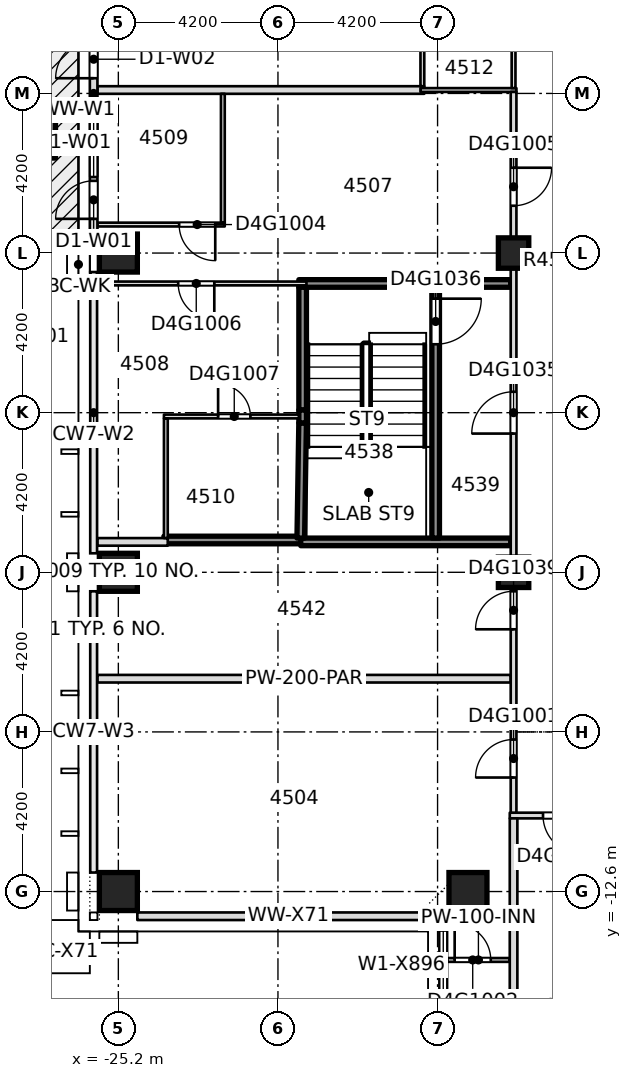
"""IFC4 building model, lengths in metres.
Left out: names, types, materials, properties, quantities, classifications, styles, units other than length and angle.
Written with IfcOpenShell. Run it as: python <this file> out.ifc"""

import sys

from ifc_helpers import new_model, si_unit, direction, frame, frame_2d, origin, origin_2d, place, context, subcontext, project, spatial, rectangle, extrude, element, fill, save


model = new_model("IFC4")
c1 = context("Model", 3, precision=1e-05, world=origin(), true_north=direction((0.0, 1.0)))
c2 = subcontext(c1, "Body", "Model", "MODEL_VIEW")
j1 = project(units=[si_unit("LENGTHUNIT", "METRE"), si_unit("PLANEANGLEUNIT", "RADIAN")], contexts=[c1])
p1 = place(None, origin())
s1 = spatial("IfcSite", under=j1, at=p1, CompositionType="ELEMENT")
p2 = place(p1, origin())
s2 = spatial("IfcBuilding", under=s1, at=p2, CompositionType="ELEMENT")
p3 = place(p2, frame((0.0, 0.0, 175.55)))
s3 = spatial("IfcBuildingStorey", under=s2, at=p3, CompositionType="ELEMENT", Elevation=175.55)
for number, where, z_axis, x_axis in (
    (1, (-25.2, -12.6, -0.4), (0.0, 0.0, 1.0), (1.0, 0.0, 0.0)),
    (2, (-16.0, -12.6, -0.4), (0.0, 0.0, 1.0), (1.0, 0.0, 0.0)),
    (3, (-25.2, -4.2, -0.4), (0.0, 0.0, 1.0), (1.0, 0.0, 0.0)),
    (4, (-25.2, 4.2, -0.4), (0.0, 0.0, 1.0), (1.0, 0.0, 0.0)),
):
    element("IfcColumn", number, at=place(p3, frame(where, z_axis=z_axis, x_axis=x_axis)), inside=s3, PredefinedType="COLUMN", context=c2, shape_type="SweptSolid", body=[
        extrude(rectangle(XDim=1.0, YDim=1.0, at=origin_2d()), origin(), (0.0, 0.0, 1.0), 3.45),
    ])
for number, where, z_axis, x_axis in (
    (5, (-14.8, -4.2, -0.4), (0.0, 0.0, 1.0), (1.0, 0.0, 0.0)),
    (6, (-14.8, 4.2, -0.4), (0.0, 0.0, 1.0), (1.0, 0.0, 0.0)),
):
    element("IfcColumn", number, at=place(p3, frame(where, z_axis=z_axis, x_axis=x_axis)), inside=s3, PredefinedType="COLUMN", context=c2, shape_type="SweptSolid", body=[
        extrude(rectangle(XDim=0.8, YDim=0.8, at=origin_2d()), origin(), (0.0, 0.0, 1.0), 3.45),
    ])
p4 = place(p3, frame((-16.55, -14.4, 0.0), z_axis=(0.0, 0.0, 1.0), x_axis=(1.0, 0.0, 0.0)))
e7 = element("IfcWall", 7, at=p4, inside=s3, PredefinedType="PARTITIONING", context=c2, shape_type="SweptSolid", body=[
    extrude(rectangle(XDim=1.65, YDim=0.1, at=frame_2d((0.825, 0.0))), origin(), (0.0, 0.0, 1.0), 3.05),
])
p5 = place(p4, frame((0.2, 0.0, 0.0)))
e8 = element("IfcOpeningElement", 8, at=p5, cuts=e7, PredefinedType="OPENING", context=c2, shape_type="SweptSolid", body=[
    extrude(rectangle(XDim=0.95, YDim=2.1, at=frame_2d((0.475, 1.05))), frame((0.0, 0.06, 0.0), z_axis=(0.0, -1.0, 0.0), x_axis=(1.0, 0.0, 0.0)), (0.0, 0.0, 1.0), 0.12),
])
p6 = place(p3, frame((-14.9, -10.6, 0.0), z_axis=(0.0, 0.0, 1.0), x_axis=(1.0, 0.0, 0.0)))
e9 = element("IfcWall", 9, at=p6, inside=s3, PredefinedType="PARTITIONING", context=c2, shape_type="SweptSolid", body=[
    extrude(rectangle(XDim=6.4, YDim=0.15, at=frame_2d((3.2, 0.0))), origin(), (0.0, 0.0, 1.0), 3.05),
])
p7 = place(p6, frame((3.95, 0.0, 0.0)))
e10 = element("IfcOpeningElement", 10, at=p7, cuts=e9, PredefinedType="OPENING", context=c2, shape_type="SweptSolid", body=[
    extrude(rectangle(XDim=1.1, YDim=2.1, at=frame_2d((0.55, 1.05))), frame((0.0, 0.085, 0.0), z_axis=(0.0, -1.0, 0.0), x_axis=(1.0, 0.0, 0.0)), (0.0, 0.0, 1.0), 0.17),
])
p8 = place(p6, frame((0.875, 0.0, 0.0)))
e11 = element("IfcOpeningElement", 11, at=p8, cuts=e9, PredefinedType="OPENING", context=c2, shape_type="SweptSolid", body=[
    extrude(rectangle(XDim=1.0, YDim=2.1, at=frame_2d((0.5, 1.05))), frame((0.0, 0.085, 0.0), z_axis=(0.0, -1.0, 0.0), x_axis=(1.0, 0.0, 0.0)), (0.0, 0.0, 1.0), 0.17),
])
p9 = place(p3, frame((-25.75, -7.0, 0.0), z_axis=(0.0, 0.0, 1.0), x_axis=(1.0, 0.0, 0.0)))
e12 = element("IfcWall", 12, at=p9, inside=s3, PredefinedType="PARTITIONING", context=c2, shape_type="SweptSolid", body=[
    extrude(rectangle(XDim=10.875, YDim=0.2, at=frame_2d((5.438, 0.0))), origin(), (0.0, 0.0, 1.0), 3.05),
])
p10 = place(p3, frame((-25.75, -3.4, 0.0), z_axis=(0.0, 0.0, 1.0), x_axis=(1.0, 0.0, 0.0)))
e13 = element("IfcWall", 13, at=p10, inside=s3, PredefinedType="PARTITIONING", context=c2, shape_type="SweptSolid", body=[
    extrude(rectangle(XDim=1.85, YDim=0.2, at=frame_2d((0.925, 0.0))), origin(), (0.0, 0.0, 1.0), 3.05),
])
p11 = place(p3, frame((-24.0, -3.35, 0.0), z_axis=(0.0, 0.0, 1.0), x_axis=(1.0, 0.0, 0.0)))
e14 = element("IfcWall", 14, at=p11, inside=s3, PredefinedType="SOLIDWALL", context=c2, shape_type="SweptSolid", body=[
    extrude(rectangle(XDim=3.7, YDim=0.2, at=frame_2d((1.85, 0.0))), origin(), (0.0, 0.0, 1.0), 3.05),
])
p12 = place(p3, frame((-20.4, -3.4, 0.0), z_axis=(0.0, 0.0, 1.0), x_axis=(1.0, 0.0, 0.0)))
e15 = element("IfcWall", 15, at=p12, inside=s3, PredefinedType="SOLIDWALL", context=c2, shape_type="SweptSolid", body=[
    extrude(rectangle(XDim=5.525, YDim=0.2, at=frame_2d((2.762, 0.0))), origin(), (0.0, 0.0, 1.0), 3.05),
])
p13 = place(p3, frame((-24.0, -0.1, 0.0), z_axis=(0.0, 0.0, 1.0), x_axis=(1.0, 0.0, 0.0)))
e16 = element("IfcWall", 16, at=p13, inside=s3, PredefinedType="PARTITIONING", context=c2, shape_type="SweptSolid", body=[
    extrude(rectangle(XDim=3.55, YDim=0.1, at=frame_2d((1.775, 0.0))), origin(), (0.0, 0.0, 1.0), 3.05),
])
p14 = place(p13, frame((1.425, 0.0, 0.0)))
e17 = element("IfcOpeningElement", 17, at=p14, cuts=e16, PredefinedType="OPENING", context=c2, shape_type="SweptSolid", body=[
    extrude(rectangle(XDim=0.85, YDim=2.1, at=frame_2d((0.425, 1.05))), frame((0.0, 0.06, 0.0), z_axis=(0.0, -1.0, 0.0), x_axis=(1.0, 0.0, 0.0)), (0.0, 0.0, 1.0), 0.12),
])
p15 = place(p3, frame((-25.75, 3.4, 0.0), z_axis=(0.0, 0.0, 1.0), x_axis=(1.0, 0.0, 0.0)))
e18 = element("IfcWall", 18, at=p15, inside=s3, PredefinedType="PARTITIONING", context=c2, shape_type="SweptSolid", body=[
    extrude(rectangle(XDim=5.5, YDim=0.1, at=frame_2d((2.75, 0.0))), origin(), (0.0, 0.0, 1.0), 3.05),
])
p16 = place(p15, frame((2.125, 0.0, 0.0)))
e19 = element("IfcOpeningElement", 19, at=p16, cuts=e18, PredefinedType="OPENING", context=c2, shape_type="SweptSolid", body=[
    extrude(rectangle(XDim=0.95, YDim=2.1, at=frame_2d((0.475, 1.05))), frame((0.0, 0.06, 0.0), z_axis=(0.0, -1.0, 0.0), x_axis=(1.0, 0.0, 0.0)), (0.0, 0.0, 1.0), 0.12),
])
p17 = place(p3, frame((-20.45, 3.4, 0.0), z_axis=(0.0, 0.0, 1.0), x_axis=(1.0, 0.0, 0.0)))
e20 = element("IfcWall", 20, at=p17, inside=s3, PredefinedType="SOLIDWALL", context=c2, shape_type="SweptSolid", body=[
    extrude(rectangle(XDim=5.575, YDim=0.2, at=frame_2d((2.788, 0.0))), origin(), (0.0, 0.0, 1.0), 3.05),
])
p18 = place(p3, frame((-25.75, 4.95, 0.0), z_axis=(0.0, 0.0, 1.0), x_axis=(1.0, 0.0, 0.0)))
e21 = element("IfcWall", 21, at=p18, inside=s3, PredefinedType="PARTITIONING", context=c2, shape_type="SweptSolid", body=[
    extrude(rectangle(XDim=3.35, YDim=0.1, at=frame_2d((1.675, 0.0))), origin(), (0.0, 0.0, 1.0), 3.05),
])
p19 = place(p18, frame((2.15, 0.0, 0.0)))
e22 = element("IfcOpeningElement", 22, at=p19, cuts=e21, PredefinedType="OPENING", context=c2, shape_type="SweptSolid", body=[
    extrude(rectangle(XDim=0.95, YDim=2.1, at=frame_2d((0.475, 1.05))), frame((0.0, 0.06, 0.0), z_axis=(0.0, -1.0, 0.0), x_axis=(1.0, 0.0, 0.0)), (0.0, 0.0, 1.0), 0.12),
])
p20 = place(p3, frame((-25.75, 8.49, 0.0), z_axis=(0.0, 0.0, 1.0), x_axis=(1.0, 0.0, 0.0)))
e23 = element("IfcWall", 23, at=p20, inside=s3, PredefinedType="PARTITIONING", context=c2, shape_type="SweptSolid", body=[
    extrude(rectangle(XDim=8.6, YDim=0.2, at=frame_2d((4.3, 0.0))), origin(), (0.0, 0.0, 1.0), 3.05),
])
p21 = place(p3, frame((-17.25, 8.49, 0.0), z_axis=(0.0, 0.0, 1.0), x_axis=(1.0, 0.0, 0.0)))
e24 = element("IfcWall", 24, at=p21, inside=s3, PredefinedType="PARTITIONING", context=c2, shape_type="SweptSolid", body=[
    extrude(rectangle(XDim=2.525, YDim=0.1, at=frame_2d((1.262, 0.0))), origin(), (0.0, 0.0, 1.0), 3.05),
])
p22 = place(p3, frame((-23.95, -3.3, 0.0), z_axis=(0.0, 0.0, 1.0), x_axis=(0.0, 1.0, 0.0)))
e25 = element("IfcWall", 25, at=p22, inside=s3, PredefinedType="PARTITIONING", context=c2, shape_type="SweptSolid", body=[
    extrude(rectangle(XDim=3.15, YDim=0.1, at=frame_2d((1.575, 0.0))), origin(), (0.0, 0.0, 1.0), 3.05),
])
p23 = place(p3, frame((-22.45, 5.0, 0.0), z_axis=(0.0, 0.0, 1.0), x_axis=(0.0, 1.0, 0.0)))
e26 = element("IfcWall", 26, at=p23, inside=s3, PredefinedType="PARTITIONING", context=c2, shape_type="SweptSolid", body=[
    extrude(rectangle(XDim=3.39, YDim=0.1, at=frame_2d((1.695, 0.0))), origin(), (0.0, 0.0, 1.0), 3.05),
])
p24 = place(p3, frame((-20.4, -3.3, 0.0), z_axis=(0.0, 0.0, 1.0), x_axis=(0.016112644959, 0.99987018291, 0.0)))
e27 = element("IfcWall", 27, at=p24, inside=s3, PredefinedType="SOLIDWALL", context=c2, shape_type="SweptSolid", body=[
    extrude(rectangle(XDim=3.031, YDim=0.2, at=frame_2d((1.515, 0.0))), origin(), (0.0, 0.0, 1.0), 3.05),
])
p25 = place(p3, frame((-20.35, 0.07, 0.0), z_axis=(0.0, 0.0, 1.0), x_axis=(0.0, 1.0, 0.0)))
e28 = element("IfcWall", 28, at=p25, inside=s3, PredefinedType="SOLIDWALL", context=c2, shape_type="SweptSolid", body=[
    extrude(rectangle(XDim=3.23, YDim=0.2, at=frame_2d((1.615, 0.0))), origin(), (0.0, 0.0, 1.0), 3.05),
])
p26 = place(p3, frame((-17.2, 8.59, 0.0), z_axis=(0.0, 0.0, 1.0), x_axis=(0.0, 1.0, 0.0)))
e29 = element("IfcWall", 29, at=p26, inside=s3, PredefinedType="PARTITIONING", context=c2, shape_type="SweptSolid", body=[
    extrude(rectangle(XDim=1.95, YDim=0.1, at=frame_2d((0.975, 0.0))), origin(), (0.0, 0.0, 1.0), 3.05),
])
p27 = place(p3, frame((-16.85, -3.3, 0.0), z_axis=(0.0, 0.0, 1.0), x_axis=(0.0, 1.0, 0.0)))
e30 = element("IfcWall", 30, at=p27, inside=s3, PredefinedType="SOLIDWALL", context=c2, shape_type="SweptSolid", body=[
    extrude(rectangle(XDim=6.6, YDim=0.2, at=frame_2d((3.3, 0.0))), origin(), (0.0, 0.0, 1.0), 3.05),
])
p28 = place(p27, frame((5.1, 0.0, 0.0)))
e31 = element("IfcOpeningElement", 31, at=p28, cuts=e30, PredefinedType="OPENING", context=c2, shape_type="SweptSolid", body=[
    extrude(rectangle(XDim=1.2, YDim=2.1, at=frame_2d((0.6, 1.05))), frame((0.0, 0.11, 0.0), z_axis=(0.0, -1.0, 0.0), x_axis=(1.0, 0.0, 0.0)), (0.0, 0.0, 1.0), 0.22),
])
p29 = place(p3, frame((-14.8, -19.65, 0.0), z_axis=(0.0, 0.0, 1.0), x_axis=(0.0, 1.0, 0.0)))
e32 = element("IfcWall", 32, at=p29, inside=s3, PredefinedType="PARTITIONING", context=c2, shape_type="SweptSolid", body=[
    extrude(rectangle(XDim=8.975, YDim=0.2, at=frame_2d((4.487, 0.0))), origin(), (0.0, 0.0, 1.0), 3.05),
])
p30 = place(p3, frame((-14.8, -10.525, 0.0), z_axis=(0.0, 0.0, 1.0), x_axis=(0.0, 1.0, 0.0)))
e33 = element("IfcWall", 33, at=p30, inside=s3, PredefinedType="PARTITIONING", context=c2, shape_type="SweptSolid", body=[
    extrude(rectangle(XDim=18.965, YDim=0.15, at=frame_2d((9.482, 0.0))), origin(), (0.0, 0.0, 1.0), 3.05),
])
p31 = place(p30, frame((0.925, 0.0, 0.0)))
e34 = element("IfcOpeningElement", 34, at=p31, cuts=e33, PredefinedType="OPENING", context=c2, shape_type="SweptSolid", body=[
    extrude(rectangle(XDim=1.0, YDim=2.1, at=frame_2d((0.5, 1.05))), frame((0.0, 0.085, 0.0), z_axis=(0.0, -1.0, 0.0), x_axis=(1.0, 0.0, 0.0)), (0.0, 0.0, 1.0), 0.17),
])
p32 = place(p30, frame((15.97, 0.0, 0.0)))
e35 = element("IfcOpeningElement", 35, at=p32, cuts=e33, PredefinedType="OPENING", context=c2, shape_type="SweptSolid", body=[
    extrude(rectangle(XDim=1.0, YDim=2.1, at=frame_2d((0.5, 1.05))), frame((0.0, 0.085, 0.0), z_axis=(0.0, -1.0, 0.0), x_axis=(1.0, 0.0, 0.0)), (0.0, 0.0, 1.0), 0.17),
])
p33 = place(p30, frame((9.975, 0.0, 0.0)))
e36 = element("IfcOpeningElement", 36, at=p33, cuts=e33, PredefinedType="OPENING", context=c2, shape_type="SweptSolid", body=[
    extrude(rectangle(XDim=1.1, YDim=2.1, at=frame_2d((0.55, 1.05))), frame((0.0, 0.085, 0.0), z_axis=(0.0, -1.0, 0.0), x_axis=(1.0, 0.0, 0.0)), (0.0, 0.0, 1.0), 0.17),
])
p34 = place(p30, frame((4.825, 0.0, 0.0)))
e37 = element("IfcOpeningElement", 37, at=p34, cuts=e33, PredefinedType="OPENING", context=c2, shape_type="SweptSolid", body=[
    extrude(rectangle(XDim=1.0, YDim=2.1, at=frame_2d((0.5, 1.05))), frame((0.0, 0.085, 0.0), z_axis=(0.0, -1.0, 0.0), x_axis=(1.0, 0.0, 0.0)), (0.0, 0.0, 1.0), 0.17),
])
p35 = place(p3, frame((-14.8, 8.54, 0.0), z_axis=(0.0, 0.0, 1.0), x_axis=(0.0, 1.0, 0.0)))
e38 = element("IfcWall", 38, at=p35, inside=s3, PredefinedType="PARTITIONING", context=c2, shape_type="SweptSolid", body=[
    extrude(rectangle(XDim=2.0, YDim=0.1, at=frame_2d((1.0, 0.0))), origin(), (0.0, 0.0, 1.0), 3.05),
])
p36 = place(p3, frame((-25.85, 12.1, 0.0), z_axis=(0.0, 0.0, 1.0), x_axis=(0.0, -1.0, 0.0)))
e39 = element("IfcWall", 39, at=p36, inside=s3, PredefinedType="STANDARD", context=c2, shape_type="SweptSolid", body=[
    extrude(rectangle(XDim=7.4, YDim=0.2, at=frame_2d((3.7, 0.0))), origin(), (0.0, 0.0, 1.0), 3.05),
])
p37 = place(p36, frame((4.1, 0.0, 0.2)))
e40 = element("IfcOpeningElement", 40, at=p37, cuts=e39, PredefinedType="OPENING", context=c2, shape_type="SweptSolid", body=[
    extrude(rectangle(XDim=1.8, YDim=2.65, at=frame_2d((0.9, 1.325))), frame((0.0, 0.11, 0.0), z_axis=(0.0, -1.0, 0.0), x_axis=(1.0, 0.0, 0.0)), (0.0, 0.0, 1.0), 0.22),
])
p38 = place(p36, frame((6.0, 0.0, 0.0)))
e41 = element("IfcOpeningElement", 41, at=p38, cuts=e39, PredefinedType="OPENING", context=c2, shape_type="SweptSolid", body=[
    extrude(rectangle(XDim=1.0, YDim=2.4, at=frame_2d((0.5, 1.2))), frame((0.0, 0.11, 0.0), z_axis=(0.0, -1.0, 0.0), x_axis=(1.0, 0.0, 0.0)), (0.0, 0.0, 1.0), 0.22),
])
p39 = place(p36, frame((0.4, 0.0, 0.2)))
e42 = element("IfcOpeningElement", 42, at=p39, cuts=e39, PredefinedType="OPENING", context=c2, shape_type="SweptSolid", body=[
    extrude(rectangle(XDim=1.8, YDim=2.65, at=frame_2d((0.9, 1.325))), frame((0.0, 0.11, 0.0), z_axis=(0.0, -1.0, 0.0), x_axis=(1.0, 0.0, 0.0)), (0.0, 0.0, 1.0), 0.22),
])
p40 = place(p36, frame((2.3, 0.0, 0.0)))
e43 = element("IfcOpeningElement", 43, at=p40, cuts=e39, PredefinedType="OPENING", context=c2, shape_type="SweptSolid", body=[
    extrude(rectangle(XDim=1.0, YDim=2.4, at=frame_2d((0.5, 1.2))), frame((0.0, 0.11, 0.0), z_axis=(0.0, -1.0, 0.0), x_axis=(1.0, 0.0, 0.0)), (0.0, 0.0, 1.0), 0.22),
])
p41 = place(p3, frame((-27.154, 8.2, -0.04), z_axis=(0.0, 0.0, 1.0), x_axis=(0.0, -1.0, 0.0)))
e44 = element("IfcWall", 44, at=p41, inside=s3, PredefinedType="USERDEFINED", context=c2, shape_type="SweptSolid", body=[
    extrude(rectangle(XDim=1.5, YDim=0.6, at=frame_2d((0.75, 0.0))), origin(), (0.0, 0.0, 1.0), 1.2),
])
p42 = place(p3, frame((-24.7, -13.25, 0.0), z_axis=(0.0, 0.0, 1.0), x_axis=(1.0, 0.0, 0.0)))
e45 = element("IfcWall", 45, at=p42, inside=s3, PredefinedType="STANDARD", context=c2, shape_type="SweptSolid", body=[
    extrude(rectangle(XDim=7.95, YDim=0.2, at=frame_2d((3.975, 0.0))), origin(), (0.0, 0.0, 1.0), 3.05),
])
p43 = place(p3, frame((-16.65, -13.35, 0.0), z_axis=(0.0, 0.0, 1.0), x_axis=(0.0, -1.0, 0.0)))
e46 = element("IfcWall", 46, at=p43, inside=s3, PredefinedType="STANDARD", context=c2, shape_type="SweptSolid", body=[
    extrude(rectangle(XDim=7.15, YDim=0.2, at=frame_2d((3.575, 0.0))), origin(), (0.0, 0.0, 1.0), 3.05),
])
p44 = place(p43, frame((3.85, 0.0, 0.2)))
e47 = element("IfcOpeningElement", 47, at=p44, cuts=e46, PredefinedType="OPENING", context=c2, shape_type="SweptSolid", body=[
    extrude(rectangle(XDim=1.8, YDim=2.65, at=frame_2d((0.9, 1.325))), frame((0.0, 0.11, 0.0), z_axis=(0.0, -1.0, 0.0), x_axis=(1.0, 0.0, 0.0)), (0.0, 0.0, 1.0), 0.22),
])
p45 = place(p43, frame((0.275, 0.0, 0.2)))
e48 = element("IfcOpeningElement", 48, at=p45, cuts=e46, PredefinedType="OPENING", context=c2, shape_type="SweptSolid", body=[
    extrude(rectangle(XDim=1.8, YDim=2.65, at=frame_2d((0.9, 1.325))), frame((0.0, 0.11, 0.0), z_axis=(0.0, -1.0, 0.0), x_axis=(1.0, 0.0, 0.0)), (0.0, 0.0, 1.0), 0.22),
])
p46 = place(p3, frame((-20.35, -0.27, 0.0), z_axis=(0.0, 0.0, 1.0), x_axis=(0.0, 1.0, 0.0)))
e49 = element("IfcWall", 49, at=p46, inside=s3, PredefinedType="SOLIDWALL", context=c2, shape_type="SweptSolid", body=[
    extrude(rectangle(XDim=0.34, YDim=0.2, at=frame_2d((0.17, 0.0))), origin(), (0.0, 0.0, 1.0), 3.05),
])
p47 = place(p31, origin())
e50 = element("IfcDoor", 50, at=p47, inside=s3, OperationType="SINGLE_SWING_LEFT", PredefinedType="DOOR", context=c2, shape_type="SweptSolid", body=[
    extrude(rectangle(XDim=1.0, YDim=2.1, at=frame_2d((0.5, 1.05))), frame((0.0, 0.025, 0.0), z_axis=(0.0, -1.0, 0.0), x_axis=(1.0, 0.0, 0.0)), (0.0, 0.0, 1.0), 0.05),
])
fill(e34, e50)
p48 = place(p5, origin())
e51 = element("IfcDoor", 51, at=p48, inside=s3, OperationType="SINGLE_SWING_RIGHT", PredefinedType="DOOR", context=c2, shape_type="SweptSolid", body=[
    extrude(rectangle(XDim=0.95, YDim=2.1, at=frame_2d((0.475, 1.05))), frame((0.0, 0.025, 0.0), z_axis=(0.0, -1.0, 0.0), x_axis=(1.0, 0.0, 0.0)), (0.0, 0.0, 1.0), 0.05),
])
fill(e8, e51)
p49 = place(p19, origin())
e52 = element("IfcDoor", 52, at=p49, inside=s3, OperationType="SINGLE_SWING_RIGHT", PredefinedType="DOOR", context=c2, shape_type="SweptSolid", body=[
    extrude(rectangle(XDim=0.95, YDim=2.1, at=frame_2d((0.475, 1.05))), frame((0.0, 0.025, 0.0), z_axis=(0.0, -1.0, 0.0), x_axis=(1.0, 0.0, 0.0)), (0.0, 0.0, 1.0), 0.05),
])
fill(e22, e52)
p50 = place(p32, origin())
e53 = element("IfcDoor", 53, at=p50, inside=s3, OperationType="SINGLE_SWING_RIGHT", PredefinedType="DOOR", context=c2, shape_type="SweptSolid", body=[
    extrude(rectangle(XDim=1.0, YDim=2.1, at=frame_2d((0.5, 1.05))), frame((0.0, 0.025, 0.0), z_axis=(0.0, -1.0, 0.0), x_axis=(1.0, 0.0, 0.0)), (0.0, 0.0, 1.0), 0.05),
])
fill(e35, e53)
p51 = place(p16, origin())
e54 = element("IfcDoor", 54, at=p51, inside=s3, OperationType="SINGLE_SWING_LEFT", PredefinedType="DOOR", context=c2, shape_type="SweptSolid", body=[
    extrude(rectangle(XDim=0.95, YDim=2.1, at=frame_2d((0.475, 1.05))), frame((0.0, 0.025, 0.0), z_axis=(0.0, -1.0, 0.0), x_axis=(1.0, 0.0, 0.0)), (0.0, 0.0, 1.0), 0.05),
])
fill(e19, e54)
p52 = place(p14, origin())
e55 = element("IfcDoor", 55, at=p52, inside=s3, OperationType="SINGLE_SWING_RIGHT", PredefinedType="DOOR", context=c2, shape_type="SweptSolid", body=[
    extrude(rectangle(XDim=0.85, YDim=2.1, at=frame_2d((0.425, 1.05))), frame((0.0, 0.025, 0.0), z_axis=(0.0, -1.0, 0.0), x_axis=(1.0, 0.0, 0.0)), (0.0, 0.0, 1.0), 0.05),
])
fill(e17, e55)
p53 = place(p33, origin())
e56 = element("IfcDoor", 56, at=p53, inside=s3, OperationType="SINGLE_SWING_RIGHT", PredefinedType="DOOR", context=c2, shape_type="SweptSolid", body=[
    extrude(rectangle(XDim=1.1, YDim=2.1, at=frame_2d((0.55, 1.05))), frame((0.0, 0.025, 0.0), z_axis=(0.0, -1.0, 0.0), x_axis=(1.0, 0.0, 0.0)), (0.0, 0.0, 1.0), 0.05),
])
fill(e36, e56)
p54 = place(p28, origin())
e57 = element("IfcDoor", 57, at=p54, inside=s3, OperationType="SINGLE_SWING_RIGHT", PredefinedType="DOOR", context=c2, shape_type="SweptSolid", body=[
    extrude(rectangle(XDim=1.2, YDim=2.1, at=frame_2d((0.6, 1.05))), frame((0.0, 0.025, 0.0), z_axis=(0.0, -1.0, 0.0), x_axis=(1.0, 0.0, 0.0)), (0.0, 0.0, 1.0), 0.05),
])
fill(e31, e57)
p55 = place(p8, origin())
e58 = element("IfcDoor", 58, at=p55, inside=s3, OperationType="SINGLE_SWING_RIGHT", PredefinedType="DOOR", context=c2, shape_type="SweptSolid", body=[
    extrude(rectangle(XDim=1.0, YDim=2.1, at=frame_2d((0.5, 1.05))), frame((0.0, 0.025, 0.0), z_axis=(0.0, -1.0, 0.0), x_axis=(1.0, 0.0, 0.0)), (0.0, 0.0, 1.0), 0.05),
])
fill(e11, e58)
p56 = place(p34, origin())
e59 = element("IfcDoor", 59, at=p56, inside=s3, OperationType="SINGLE_SWING_RIGHT", PredefinedType="DOOR", context=c2, shape_type="SweptSolid", body=[
    extrude(rectangle(XDim=1.0, YDim=2.1, at=frame_2d((0.5, 1.05))), frame((0.0, 0.025, 0.0), z_axis=(0.0, -1.0, 0.0), x_axis=(1.0, 0.0, 0.0)), (0.0, 0.0, 1.0), 0.05),
])
fill(e37, e59)
p57 = place(p37, origin())
e60 = element("IfcWindow", 60, at=p57, inside=s3, PartitioningType="SINGLE_PANEL", PredefinedType="WINDOW", context=c2, shape_type="SweptSolid", body=[
    extrude(rectangle(XDim=1.8, YDim=2.65, at=frame_2d((0.9, 1.325))), frame((0.0, 0.03, 0.0), z_axis=(0.0, -1.0, 0.0), x_axis=(1.0, 0.0, 0.0)), (0.0, 0.0, 1.0), 0.06),
])
fill(e40, e60)
p58 = place(p38, origin())
e61 = element("IfcDoor", 61, at=p58, inside=s3, OperationType="SINGLE_SWING_LEFT", PredefinedType="DOOR", context=c2, shape_type="SweptSolid", body=[
    extrude(rectangle(XDim=1.0, YDim=2.4, at=frame_2d((0.5, 1.2))), frame((0.0, 0.025, 0.0), z_axis=(0.0, -1.0, 0.0), x_axis=(1.0, 0.0, 0.0)), (0.0, 0.0, 1.0), 0.05),
])
fill(e41, e61)
p59 = place(p40, origin())
e62 = element("IfcDoor", 62, at=p59, inside=s3, OperationType="SINGLE_SWING_LEFT", PredefinedType="DOOR", context=c2, shape_type="SweptSolid", body=[
    extrude(rectangle(XDim=1.0, YDim=2.4, at=frame_2d((0.5, 1.2))), frame((0.0, 0.025, 0.0), z_axis=(0.0, -1.0, 0.0), x_axis=(1.0, 0.0, 0.0)), (0.0, 0.0, 1.0), 0.05),
])
fill(e43, e62)
p60 = place(p45, origin())
e63 = element("IfcWindow", 63, at=p60, inside=s3, PartitioningType="SINGLE_PANEL", PredefinedType="WINDOW", context=c2, shape_type="SweptSolid", body=[
    extrude(rectangle(XDim=1.8, YDim=2.65, at=frame_2d((0.9, 1.325))), frame((0.0, 0.03, 0.0), z_axis=(0.0, -1.0, 0.0), x_axis=(1.0, 0.0, 0.0)), (0.0, 0.0, 1.0), 0.06),
])
fill(e48, e63)
save(model, sys.argv[1])
